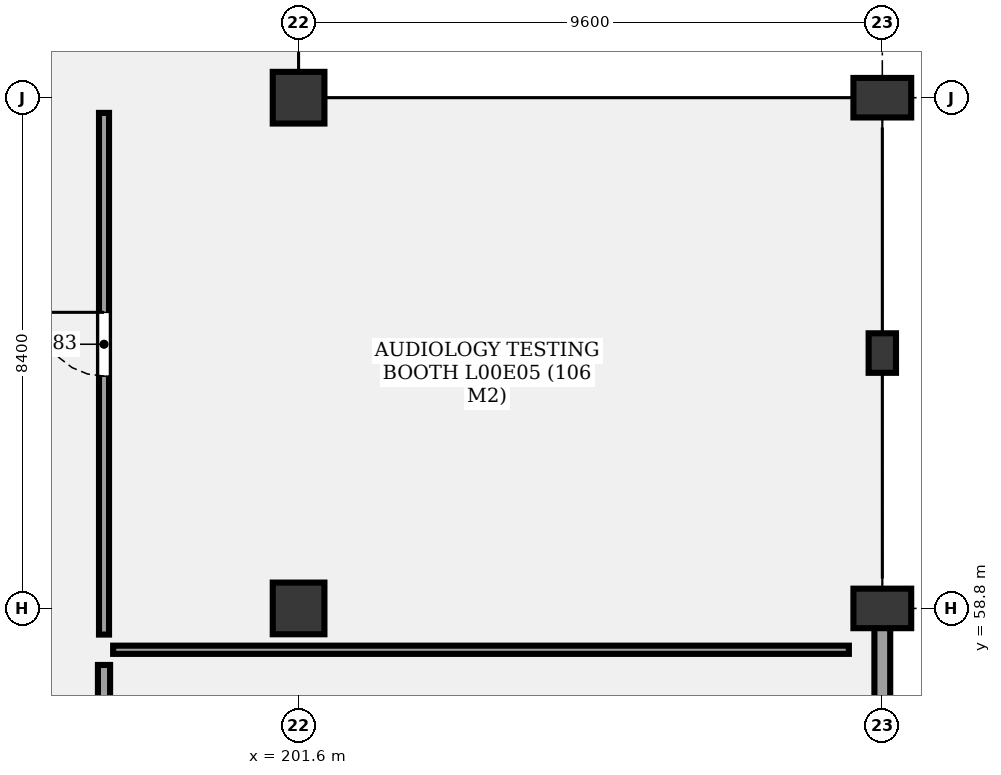
"""IFC4 building model, lengths in metres.
Left out: names, types, materials, properties, quantities, classifications, styles, units other than length and angle.
Written with IfcOpenShell. Run it as: python <this file> out.ifc"""

import sys

from ifc_helpers import new_model, si_unit, direction, frame, frame_2d, origin, origin_2d, place, context, subcontext, project, spatial, rectangle, extrude, element, fill, save


model = new_model("IFC4")
c1 = context("Model", 3, precision=1e-05, world=origin(), true_north=direction((0.0, 1.0)))
c2 = subcontext(c1, "Body", "Model", "MODEL_VIEW")
j1 = project(units=[si_unit("LENGTHUNIT", "METRE"), si_unit("PLANEANGLEUNIT", "RADIAN")], contexts=[c1])
p1 = place(None, origin())
s1 = spatial("IfcSite", under=j1, at=p1, CompositionType="ELEMENT")
p2 = place(p1, origin())
s2 = spatial("IfcBuilding", under=s1, at=p2, CompositionType="ELEMENT")
p3 = place(p2, origin())
s3 = spatial("IfcBuildingStorey", under=s2, at=p3, CompositionType="ELEMENT", Elevation=0.0)
for number, where, z_axis, x_axis in (
    (1, (201.6, 58.8, -0.35), (0.0, 0.0, 1.0), (1.0, 0.0, 0.0)),
    (2, (201.6, 67.2, -0.35), (0.0, 0.0, 1.0), (1.0, 0.0, 0.0)),
):
    element("IfcColumn", number, at=place(p3, frame(where, z_axis=z_axis, x_axis=x_axis)), inside=s3, PredefinedType="COLUMN", context=c2, shape_type="SweptSolid", body=[
        extrude(rectangle(XDim=0.85, YDim=0.85, at=origin_2d()), origin(), (0.0, 0.0, 1.0), 5.45),
    ])
for number, where, z_axis, x_axis in (
    (3, (211.2, 58.8, -0.35), (0.0, 0.0, 1.0), (0.0, 1.0, 0.0)),
    (4, (211.2, 67.2, -0.35), (0.0, 0.0, 1.0), (0.0, 1.0, 0.0)),
):
    element("IfcColumn", number, at=place(p3, frame(where, z_axis=z_axis, x_axis=x_axis)), inside=s3, PredefinedType="COLUMN", context=c2, shape_type="SweptSolid", body=[
        extrude(rectangle(XDim=0.95, YDim=0.65, at=origin_2d()), origin(), (0.0, 0.0, 1.0), 5.45),
    ])
p4 = place(p3, frame((211.2, 63.0, 0.0), z_axis=(0.0, 0.0, 1.0), x_axis=(1.0, 0.0, 0.0)))
e5 = element("IfcColumn", 5, at=p4, inside=s3, PredefinedType="PILASTER", context=c2, shape_type="SweptSolid", body=[
    extrude(rectangle(XDim=0.45, YDim=0.65, at=origin_2d()), origin(), (0.0, 0.0, 1.0), 5.1),
])
p5 = place(p3, frame((211.2, 58.8, 0.0), z_axis=(0.0, 0.0, 1.0), x_axis=(0.0, -1.0, 0.0)))
e6 = element("IfcWall", 6, at=p5, inside=s3, PredefinedType="SOLIDWALL", context=c2, shape_type="SweptSolid", body=[
    extrude(rectangle(XDim=8.4, YDim=0.26, at=frame_2d((4.2, 0.0))), origin(), (0.0, 0.0, 1.0), 4.24),
])
p6 = place(p5, frame((3.1, 0.0, 0.0)))
e7 = element("IfcOpeningElement", 7, at=p6, cuts=e6, PredefinedType="OPENING", context=c2, shape_type="SweptSolid", body=[
    extrude(rectangle(XDim=2.2, YDim=2.5, at=frame_2d((1.1, 1.25))), frame((0.0, 0.14, 0.0), z_axis=(0.0, -1.0, 0.0), x_axis=(1.0, 0.0, 0.0)), (0.0, 0.0, 1.0), 0.28),
])
p7 = place(p3, frame((198.4, 49.29, 0.0), z_axis=(0.0, 0.0, 1.0), x_axis=(0.0, 1.0, 0.0)))
e8 = element("IfcWall", 8, at=p7, inside=s3, PredefinedType="PARTITIONING", context=c2, shape_type="SweptSolid", body=[
    extrude(rectangle(XDim=8.58, YDim=0.2, at=frame_2d((4.29, 0.0))), origin(), (0.0, 0.0, 1.0), 3.98),
])
p8 = place(p7, frame((3.95, 0.0, 0.0)))
e9 = element("IfcOpeningElement", 9, at=p8, cuts=e8, PredefinedType="OPENING", context=c2, shape_type="SweptSolid", body=[
    extrude(rectangle(XDim=1.6, YDim=2.2, at=frame_2d((0.8, 1.1))), frame((0.0, 0.11, 0.0), z_axis=(0.0, -1.0, 0.0), x_axis=(1.0, 0.0, 0.0)), (0.0, 0.0, 1.0), 0.22),
])
p9 = place(p3, frame((198.4, 58.37, 0.0), z_axis=(0.0, 0.0, 1.0), x_axis=(0.0, 1.0, 0.0)))
e10 = element("IfcWall", 10, at=p9, inside=s3, PredefinedType="PARTITIONING", context=c2, shape_type="SweptSolid", body=[
    extrude(rectangle(XDim=8.58, YDim=0.165, at=frame_2d((4.29, 0.0))), origin(), (0.0, 0.0, 1.0), 3.98),
])
p10 = place(p9, frame((4.25, 0.0, 0.0)))
e11 = element("IfcOpeningElement", 11, at=p10, cuts=e10, PredefinedType="OPENING", context=c2, shape_type="SweptSolid", body=[
    extrude(rectangle(XDim=1.05, YDim=2.1, at=frame_2d((0.525, 1.05))), frame((0.0, 0.093, 0.0), z_axis=(0.0, -1.0, 0.0), x_axis=(1.0, 0.0, 0.0)), (0.0, 0.0, 1.0), 0.185),
])
p11 = place(p3, frame((198.55, 58.12, 0.0), z_axis=(0.0, 0.0, 1.0), x_axis=(1.0, 0.0, 0.0)))
e12 = element("IfcWall", 12, at=p11, inside=s3, PredefinedType="PARTITIONING", context=c2, shape_type="SweptSolid", body=[
    extrude(rectangle(XDim=12.1, YDim=0.135, at=frame_2d((6.05, 0.0))), origin(), (0.0, 0.0, 1.0), 3.98),
])
p12 = place(p10, origin())
e13 = element("IfcDoor", 13, at=p12, inside=s3, OperationType="SINGLE_SWING_RIGHT", PredefinedType="DOOR", context=c2, shape_type="SweptSolid", body=[
    extrude(rectangle(XDim=1.05, YDim=2.1, at=frame_2d((0.525, 1.05))), frame((0.0, 0.025, 0.0), z_axis=(0.0, -1.0, 0.0), x_axis=(1.0, 0.0, 0.0)), (0.0, 0.0, 1.0), 0.05),
])
fill(e11, e13)
save(model, sys.argv[1])
